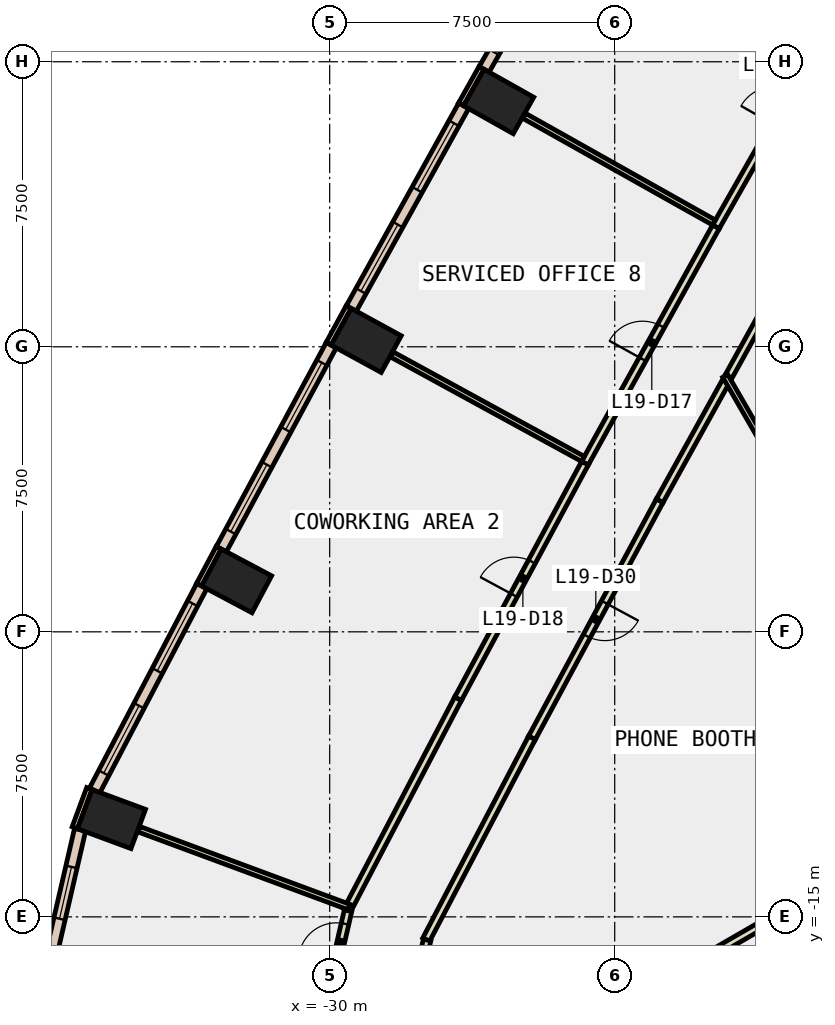
"""IFC4 building model, lengths in metres.
Left out: names, types, materials, properties, quantities, classifications, styles, units other than length and angle.
Written with IfcOpenShell. Run it as: python <this file> out.ifc"""

import sys

from ifc_helpers import new_model, si_unit, direction, frame, frame_2d, origin, origin_2d, place, context, subcontext, project, spatial, rectangle, extrude, element, fill, save


model = new_model("IFC4")
c1 = context("Model", 3, precision=1e-05, world=origin(), true_north=direction((0.0, 1.0)))
c2 = subcontext(c1, "Body", "Model", "MODEL_VIEW")
j1 = project(units=[si_unit("LENGTHUNIT", "METRE"), si_unit("PLANEANGLEUNIT", "RADIAN")], contexts=[c1])
p1 = place(None, origin())
s1 = spatial("IfcSite", under=j1, at=p1, CompositionType="ELEMENT")
p2 = place(p1, origin())
s2 = spatial("IfcBuilding", under=s1, at=p2, CompositionType="ELEMENT")
p3 = place(p2, frame((0.0, 0.0, 90.8)))
s3 = spatial("IfcBuildingStorey", under=s2, at=p3, CompositionType="ELEMENT", Elevation=90.8)
for number, where, z_axis, x_axis in (
    (1, (-25.554, 6.454, -0.4), (0.0, 0.0, 1.0), (0.49, 0.872, 0.0)),
    (2, (-29.039, 0.167, -0.4), (0.0, 0.0, 1.0), (0.48, 0.877, 0.0)),
    (3, (-32.449, -6.16, -0.4), (0.0, 0.0, 1.0), (0.469, 0.883, 0.0)),
    (4, (-35.741, -12.427, -0.4), (0.0, 0.0, 1.0), (0.347, 0.938, 0.0)),
):
    element("IfcColumn", number, at=place(p3, frame(where, z_axis=z_axis, x_axis=x_axis)), inside=s3, PredefinedType="COLUMN", context=c2, shape_type="SweptSolid", body=[
        extrude(rectangle(XDim=1.1, YDim=1.5, at=origin_2d()), origin(), (0.0, 0.0, 1.0), 4.2),
    ])
p4 = place(p3, frame((-26.004, 7.338, 0.0), z_axis=(0.0, 0.0, 1.0), x_axis=(-0.490008344094, -0.871717742574, 0.0)))
e5 = element("IfcWall", 5, at=p4, inside=s3, PredefinedType="STANDARD", context=c2, shape_type="SweptSolid", body=[
    extrude(rectangle(XDim=1.1, YDim=0.15, at=frame_2d((0.55, 0.0))), origin(), (0.0, 0.0, 1.0), 3.8),
])
p5 = place(p3, frame((-29.499, 1.046, 0.0), z_axis=(0.0, 0.0, 1.0), x_axis=(-0.479737645119, -0.877411985247, 0.0)))
e6 = element("IfcWall", 6, at=p5, inside=s3, PredefinedType="STANDARD", context=c2, shape_type="SweptSolid", body=[
    extrude(rectangle(XDim=1.101, YDim=0.15, at=frame_2d((0.55, 0.0))), origin(), (0.0, 0.0, 1.0), 3.8),
])
p6 = place(p3, frame((-32.92, -5.288, 0.0), z_axis=(0.0, 0.0, 1.0), x_axis=(-0.469366248657, -0.883003581319, 0.0)))
e7 = element("IfcWall", 7, at=p6, inside=s3, PredefinedType="STANDARD", context=c2, shape_type="SweptSolid", body=[
    extrude(rectangle(XDim=1.1, YDim=0.15, at=frame_2d((0.55, 0.0))), origin(), (0.0, 0.0, 1.0), 3.8),
])
p7 = place(p3, frame((-36.324, -11.624, 0.0), z_axis=(0.0, 0.0, 1.0), x_axis=(-0.347205967468, -0.937788897436, 0.0)))
e8 = element("IfcWall", 8, at=p7, inside=s3, PredefinedType="STANDARD", context=c2, shape_type="SweptSolid", body=[
    extrude(rectangle(XDim=1.1, YDim=0.15, at=frame_2d((0.55, 0.0))), origin(), (0.0, 0.0, 1.0), 3.8),
])
p8 = place(p3, frame((-22.918, 12.598, 0.0), z_axis=(0.0, 0.0, 1.0), x_axis=(-0.49492259535, -0.868937065967, 0.0)))
e9 = element("IfcWall", 9, at=p8, inside=s3, PredefinedType="STANDARD", context=c2, shape_type="SweptSolid", body=[
    extrude(rectangle(XDim=6.098, YDim=0.3, at=frame_2d((3.049, 0.0))), origin(), (0.0, 0.0, 1.0), 3.8),
])
p9 = place(p8, frame((0.525, 0.0, 0.9)))
e10 = element("IfcOpeningElement", 10, at=p9, cuts=e9, PredefinedType="OPENING", context=c2, shape_type="SweptSolid", body=[
    extrude(rectangle(XDim=2.0, YDim=2.6, at=frame_2d((1.0, 1.3))), frame((0.0, 0.16, 0.0), z_axis=(0.0, -1.0, 0.0), x_axis=(1.0, 0.0, 0.0)), (0.0, 0.0, 1.0), 0.32),
])
p10 = place(p8, frame((3.574, 0.0, 0.9)))
e11 = element("IfcOpeningElement", 11, at=p10, cuts=e9, PredefinedType="OPENING", context=c2, shape_type="SweptSolid", body=[
    extrude(rectangle(XDim=2.0, YDim=2.6, at=frame_2d((1.0, 1.3))), frame((0.0, 0.16, 0.0), z_axis=(0.0, -1.0, 0.0), x_axis=(1.0, 0.0, 0.0)), (0.0, 0.0, 1.0), 0.32),
])
p11 = place(p3, frame((-26.474, 6.341, 0.0), z_axis=(0.0, 0.0, 1.0), x_axis=(-0.484823579315, -0.874611969356, 0.0)))
e12 = element("IfcWall", 12, at=p11, inside=s3, PredefinedType="STANDARD", context=c2, shape_type="SweptSolid", body=[
    extrude(rectangle(XDim=6.099, YDim=0.3, at=frame_2d((3.049, 0.0))), origin(), (0.0, 0.0, 1.0), 3.8),
])
p12 = place(p11, frame((0.525, 0.0, 0.9)))
e13 = element("IfcOpeningElement", 13, at=p12, cuts=e12, PredefinedType="OPENING", context=c2, shape_type="SweptSolid", body=[
    extrude(rectangle(XDim=2.0, YDim=2.6, at=frame_2d((1.0, 1.3))), frame((0.0, 0.16, 0.0), z_axis=(0.0, -1.0, 0.0), x_axis=(1.0, 0.0, 0.0)), (0.0, 0.0, 1.0), 0.32),
])
p13 = place(p11, frame((3.574, 0.0, 0.9)))
e14 = element("IfcOpeningElement", 14, at=p13, cuts=e12, PredefinedType="OPENING", context=c2, shape_type="SweptSolid", body=[
    extrude(rectangle(XDim=2.0, YDim=2.6, at=frame_2d((1.0, 1.3))), frame((0.0, 0.16, 0.0), z_axis=(0.0, -1.0, 0.0), x_axis=(1.0, 0.0, 0.0)), (0.0, 0.0, 1.0), 0.32),
])
p14 = place(p3, frame((-29.958, 0.044, 0.0), z_axis=(0.0, 0.0, 1.0), x_axis=(-0.474369552216, -0.880325807829, 0.0)))
e15 = element("IfcWall", 15, at=p14, inside=s3, PredefinedType="STANDARD", context=c2, shape_type="SweptSolid", body=[
    extrude(rectangle(XDim=6.099, YDim=0.3, at=frame_2d((3.049, 0.0))), origin(), (0.0, 0.0, 1.0), 3.8),
])
p15 = place(p14, frame((0.525, 0.0, 0.9)))
e16 = element("IfcOpeningElement", 16, at=p15, cuts=e15, PredefinedType="OPENING", context=c2, shape_type="SweptSolid", body=[
    extrude(rectangle(XDim=2.0, YDim=2.6, at=frame_2d((1.0, 1.3))), frame((0.0, 0.16, 0.0), z_axis=(0.0, -1.0, 0.0), x_axis=(1.0, 0.0, 0.0)), (0.0, 0.0, 1.0), 0.32),
])
p16 = place(p14, frame((3.574, 0.0, 0.9)))
e17 = element("IfcOpeningElement", 17, at=p16, cuts=e15, PredefinedType="OPENING", context=c2, shape_type="SweptSolid", body=[
    extrude(rectangle(XDim=2.0, YDim=2.6, at=frame_2d((1.0, 1.3))), frame((0.0, 0.16, 0.0), z_axis=(0.0, -1.0, 0.0), x_axis=(1.0, 0.0, 0.0)), (0.0, 0.0, 1.0), 0.32),
])
p17 = place(p3, frame((-33.366, -6.295, 0.0), z_axis=(0.0, 0.0, 1.0), x_axis=(-0.464187178015, -0.885737130173, 0.0)))
e18 = element("IfcWall", 18, at=p17, inside=s3, PredefinedType="STANDARD", context=c2, shape_type="SweptSolid", body=[
    extrude(rectangle(XDim=6.075, YDim=0.3, at=frame_2d((3.038, 0.0))), origin(), (0.0, 0.0, 1.0), 3.8),
])
p18 = place(p17, frame((0.519, 0.0, 0.9)))
e19 = element("IfcOpeningElement", 19, at=p18, cuts=e18, PredefinedType="OPENING", context=c2, shape_type="SweptSolid", body=[
    extrude(rectangle(XDim=2.0, YDim=2.6, at=frame_2d((1.0, 1.3))), frame((0.0, 0.16, 0.0), z_axis=(0.0, -1.0, 0.0), x_axis=(1.0, 0.0, 0.0)), (0.0, 0.0, 1.0), 0.32),
])
p19 = place(p17, frame((3.556, 0.0, 0.9)))
e20 = element("IfcOpeningElement", 20, at=p19, cuts=e18, PredefinedType="OPENING", context=c2, shape_type="SweptSolid", body=[
    extrude(rectangle(XDim=2.0, YDim=2.6, at=frame_2d((1.0, 1.3))), frame((0.0, 0.16, 0.0), z_axis=(0.0, -1.0, 0.0), x_axis=(1.0, 0.0, 0.0)), (0.0, 0.0, 1.0), 0.32),
])
p20 = place(p3, frame((-36.568, -12.706, 0.0), z_axis=(0.0, 0.0, 1.0), x_axis=(-0.224859506699, -0.974391195695, 0.0)))
e21 = element("IfcWall", 21, at=p20, inside=s3, PredefinedType="STANDARD", context=c2, shape_type="SweptSolid", body=[
    extrude(rectangle(XDim=3.41, YDim=0.3, at=frame_2d((1.705, 0.0))), origin(), (0.0, 0.0, 1.0), 3.8),
])
p21 = place(p20, frame((1.005, 0.0, 0.9)))
e22 = element("IfcOpeningElement", 22, at=p21, cuts=e21, PredefinedType="OPENING", context=c2, shape_type="SweptSolid", body=[
    extrude(rectangle(XDim=1.4, YDim=2.6, at=frame_2d((0.7, 1.3))), frame((0.0, 0.16, 0.0), z_axis=(0.0, -1.0, 0.0), x_axis=(1.0, 0.0, 0.0)), (0.0, 0.0, 1.0), 0.32),
])
p22 = place(p3, frame((-17.883, 2.143, 0.0), z_axis=(0.0, 0.0, 1.0), x_axis=(-0.484695523805, -0.874682942101, 0.0)))
e23 = element("IfcWall", 23, at=p22, inside=s3, PredefinedType="PARTITIONING", context=c2, shape_type="SweptSolid", body=[
    extrude(rectangle(XDim=3.349, YDim=0.2, at=frame_2d((1.674, 0.0))), origin(), (0.0, 0.0, 1.0), 3.8),
])
p23 = place(p3, frame((-19.579, -0.917, 0.0), z_axis=(0.0, 0.0, 1.0), x_axis=(-0.484700239797, -0.874680328772, 0.0)))
e24 = element("IfcWall", 24, at=p23, inside=s3, PredefinedType="PARTITIONING", context=c2, shape_type="SweptSolid", body=[
    extrude(rectangle(XDim=3.585, YDim=0.2, at=frame_2d((1.792, 0.0))), origin(), (0.0, 0.0, 1.0), 3.8),
])
p24 = place(p3, frame((-21.317, -4.053, 0.0), z_axis=(0.0, 0.0, 1.0), x_axis=(-0.474391588657, -0.880313932987, 0.0)))
e25 = element("IfcWall", 25, at=p24, inside=s3, PredefinedType="PARTITIONING", context=c2, shape_type="SweptSolid", body=[
    extrude(rectangle(XDim=7.085, YDim=0.2, at=frame_2d((3.542, 0.0))), origin(), (0.0, 0.0, 1.0), 3.8),
])
p25 = place(p24, frame((3.042, 0.0, 0.0)))
e26 = element("IfcOpeningElement", 26, at=p25, cuts=e25, PredefinedType="OPENING", context=c2, shape_type="SweptSolid", body=[
    extrude(rectangle(XDim=1.0, YDim=2.1, at=frame_2d((0.5, 1.05))), frame((0.0, 0.11, 0.0), z_axis=(0.0, -1.0, 0.0), x_axis=(1.0, 0.0, 0.0)), (0.0, 0.0, 1.0), 0.22),
])
p26 = place(p3, frame((-24.678, -10.29, 0.0), z_axis=(0.0, 0.0, 1.0), x_axis=(-0.464203280494, -0.885728691179, 0.0)))
e27 = element("IfcWall", 27, at=p26, inside=s3, PredefinedType="PARTITIONING", context=c2, shape_type="SweptSolid", body=[
    extrude(rectangle(XDim=5.995, YDim=0.2, at=frame_2d((2.998, 0.0))), origin(), (0.0, 0.0, 1.0), 3.8),
])
p27 = place(p3, frame((-27.437, -15.609, 0.0), z_axis=(0.0, 0.0, 1.0), x_axis=(-0.224098195188, -0.97456656977, 0.0)))
e28 = element("IfcWall", 28, at=p27, inside=s3, PredefinedType="PARTITIONING", context=c2, shape_type="SweptSolid", body=[
    extrude(rectangle(XDim=0.375, YDim=0.2, at=frame_2d((0.188, 0.0))), origin(), (0.0, 0.0, 1.0), 3.8),
])
p28 = place(p3, frame((-19.838, 3.156, 0.0), z_axis=(0.0, 0.0, 1.0), x_axis=(0.494978648769, 0.868905137091, 0.0)))
e29 = element("IfcWall", 29, at=p28, inside=s3, PredefinedType="PARTITIONING", context=c2, shape_type="SweptSolid", body=[
    extrude(rectangle(XDim=7.186, YDim=0.2, at=frame_2d((3.593, 0.0))), origin(), (0.0, 0.0, 1.0), 3.8),
])
p29 = place(p28, frame((3.093, 0.0, 0.0)))
e30 = element("IfcOpeningElement", 30, at=p29, cuts=e29, PredefinedType="OPENING", context=c2, shape_type="SweptSolid", body=[
    extrude(rectangle(XDim=1.0, YDim=2.1, at=frame_2d((0.5, 1.05))), frame((0.0, 0.11, 0.0), z_axis=(0.0, -1.0, 0.0), x_axis=(1.0, 0.0, 0.0)), (0.0, 0.0, 1.0), 0.22),
])
p30 = place(p3, frame((-23.284, -3.064, 0.0), z_axis=(0.0, 0.0, 1.0), x_axis=(0.48478560119, 0.874633020689, 0.0)))
e31 = element("IfcWall", 31, at=p30, inside=s3, PredefinedType="PARTITIONING", context=c2, shape_type="SweptSolid", body=[
    extrude(rectangle(XDim=7.11, YDim=0.2, at=frame_2d((3.555, 0.0))), origin(), (0.0, 0.0, 1.0), 3.8),
])
p31 = place(p30, frame((3.13, 0.0, 0.0)))
e32 = element("IfcOpeningElement", 32, at=p31, cuts=e31, PredefinedType="OPENING", context=c2, shape_type="SweptSolid", body=[
    extrude(rectangle(XDim=1.0, YDim=2.1, at=frame_2d((0.5, 1.05))), frame((0.0, 0.11, 0.0), z_axis=(0.0, -1.0, 0.0), x_axis=(1.0, 0.0, 0.0)), (0.0, 0.0, 1.0), 0.22),
])
p32 = place(p3, frame((-29.541, -14.829, 0.0), z_axis=(0.0, 0.0, 1.0), x_axis=(0.46422598759, 0.885716790202, 0.0)))
e33 = element("IfcWall", 33, at=p32, inside=s3, PredefinedType="PARTITIONING", context=c2, shape_type="SweptSolid", body=[
    extrude(rectangle(XDim=6.29, YDim=0.2, at=frame_2d((3.145, 0.0))), origin(), (0.0, 0.0, 1.0), 3.8),
])
p33 = place(p3, frame((-26.621, -9.258, 0.0), z_axis=(0.0, 0.0, 1.0), x_axis=(0.474414295505, 0.880301696136, 0.0)))
e34 = element("IfcWall", 34, at=p33, inside=s3, PredefinedType="PARTITIONING", context=c2, shape_type="SweptSolid", body=[
    extrude(rectangle(XDim=7.036, YDim=0.2, at=frame_2d((3.518, 0.0))), origin(), (0.0, 0.0, 1.0), 3.8),
])
p34 = place(p33, frame((3.093, 0.0, 0.0)))
e35 = element("IfcOpeningElement", 35, at=p34, cuts=e34, PredefinedType="OPENING", context=c2, shape_type="SweptSolid", body=[
    extrude(rectangle(XDim=1.0, YDim=2.1, at=frame_2d((0.5, 1.05))), frame((0.0, 0.11, 0.0), z_axis=(0.0, -1.0, 0.0), x_axis=(1.0, 0.0, 0.0)), (0.0, 0.0, 1.0), 0.22),
])
p35 = place(p3, frame((-29.9, -16.501, 0.0), z_axis=(0.0, 0.0, 1.0), x_axis=(0.224316169854, 0.974516421587, 0.0)))
e36 = element("IfcWall", 36, at=p35, inside=s3, PredefinedType="PARTITIONING", context=c2, shape_type="SweptSolid", body=[
    extrude(rectangle(XDim=1.707, YDim=0.2, at=frame_2d((0.853, 0.0))), origin(), (0.0, 0.0, 1.0), 3.8),
])
p36 = place(p35, frame((0.353, 0.0, 0.0)))
e37 = element("IfcOpeningElement", 37, at=p36, cuts=e36, PredefinedType="OPENING", context=c2, shape_type="SweptSolid", body=[
    extrude(rectangle(XDim=1.0, YDim=2.1, at=frame_2d((0.5, 1.05))), frame((0.0, 0.11, 0.0), z_axis=(0.0, -1.0, 0.0), x_axis=(1.0, 0.0, 0.0)), (0.0, 0.0, 1.0), 0.22),
])
p37 = place(p3, frame((-13.072, -12.009, 0.0), z_axis=(0.0, 0.0, 1.0), x_axis=(-0.865993734772, -0.500054848326, 0.0)))
e38 = element("IfcWall", 38, at=p37, inside=s3, PredefinedType="PARTITIONING", context=c2, shape_type="SweptSolid", body=[
    extrude(rectangle(XDim=8.583, YDim=0.2, at=frame_2d((4.292, 0.0))), origin(), (0.0, 0.0, 1.0), 3.8),
])
p38 = place(p3, frame((-19.888, 3.27, 0.0), z_axis=(0.0, 0.0, 1.0), x_axis=(-0.871789386467, 0.489880868828, 0.0)))
e39 = element("IfcWall", 39, at=p38, inside=s3, PredefinedType="PARTITIONING", context=c2, shape_type="SweptSolid", body=[
    extrude(rectangle(XDim=5.73, YDim=0.15, at=frame_2d((2.865, 0.0))), origin(), (0.0, 0.0, 1.0), 3.8),
])
p39 = place(p3, frame((-23.336, -2.95, 0.0), z_axis=(0.0, 0.0, 1.0), x_axis=(-0.877455496162, 0.479658057637, 0.0)))
e40 = element("IfcWall", 40, at=p39, inside=s3, PredefinedType="PARTITIONING", context=c2, shape_type="SweptSolid", body=[
    extrude(rectangle(XDim=5.729, YDim=0.15, at=frame_2d((2.865, 0.0))), origin(), (0.0, 0.0, 1.0), 3.8),
])
p40 = place(p3, frame((-29.494, -14.741, 0.0), z_axis=(0.0, 0.0, 1.0), x_axis=(-0.937719767819, 0.347392626636, 0.0)))
e41 = element("IfcWall", 41, at=p40, inside=s3, PredefinedType="PARTITIONING", context=c2, shape_type="SweptSolid", body=[
    extrude(rectangle(XDim=5.892, YDim=0.15, at=frame_2d((2.946, 0.0))), origin(), (0.0, 0.0, 1.0), 3.8),
])
p41 = place(p3, frame((-15.225, -8.328, 0.0), z_axis=(0.0, 0.0, 1.0), x_axis=(-0.500038648455, 0.866003088939, 0.0)))
e42 = element("IfcWall", 42, at=p41, inside=s3, PredefinedType="PARTITIONING", context=c2, shape_type="SweptSolid", body=[
    extrude(rectangle(XDim=8.733, YDim=0.15, at=frame_2d((4.367, 0.0))), origin(), (0.0, 0.0, 1.0), 3.8),
])
p42 = place(p10, origin())
e43 = element("IfcWindow", 43, at=p42, inside=s3, PartitioningType="SINGLE_PANEL", PredefinedType="WINDOW", context=c2, shape_type="SweptSolid", body=[
    extrude(rectangle(XDim=2.0, YDim=2.6, at=frame_2d((1.0, 1.3))), frame((0.0, 0.03, 0.0), z_axis=(0.0, -1.0, 0.0), x_axis=(1.0, 0.0, 0.0)), (0.0, 0.0, 1.0), 0.06),
])
fill(e11, e43)
p43 = place(p12, origin())
e44 = element("IfcWindow", 44, at=p43, inside=s3, PartitioningType="SINGLE_PANEL", PredefinedType="WINDOW", context=c2, shape_type="SweptSolid", body=[
    extrude(rectangle(XDim=2.0, YDim=2.6, at=frame_2d((1.0, 1.3))), frame((0.0, 0.03, 0.0), z_axis=(0.0, -1.0, 0.0), x_axis=(1.0, 0.0, 0.0)), (0.0, 0.0, 1.0), 0.06),
])
fill(e13, e44)
p44 = place(p13, origin())
e45 = element("IfcWindow", 45, at=p44, inside=s3, PartitioningType="SINGLE_PANEL", PredefinedType="WINDOW", context=c2, shape_type="SweptSolid", body=[
    extrude(rectangle(XDim=2.0, YDim=2.6, at=frame_2d((1.0, 1.3))), frame((0.0, 0.03, 0.0), z_axis=(0.0, -1.0, 0.0), x_axis=(1.0, 0.0, 0.0)), (0.0, 0.0, 1.0), 0.06),
])
fill(e14, e45)
p45 = place(p15, origin())
e46 = element("IfcWindow", 46, at=p45, inside=s3, PartitioningType="SINGLE_PANEL", PredefinedType="WINDOW", context=c2, shape_type="SweptSolid", body=[
    extrude(rectangle(XDim=2.0, YDim=2.6, at=frame_2d((1.0, 1.3))), frame((0.0, 0.03, 0.0), z_axis=(0.0, -1.0, 0.0), x_axis=(1.0, 0.0, 0.0)), (0.0, 0.0, 1.0), 0.06),
])
fill(e16, e46)
p46 = place(p16, origin())
e47 = element("IfcWindow", 47, at=p46, inside=s3, PartitioningType="SINGLE_PANEL", PredefinedType="WINDOW", context=c2, shape_type="SweptSolid", body=[
    extrude(rectangle(XDim=2.0, YDim=2.6, at=frame_2d((1.0, 1.3))), frame((0.0, 0.03, 0.0), z_axis=(0.0, -1.0, 0.0), x_axis=(1.0, 0.0, 0.0)), (0.0, 0.0, 1.0), 0.06),
])
fill(e17, e47)
p47 = place(p18, origin())
e48 = element("IfcWindow", 48, at=p47, inside=s3, PartitioningType="SINGLE_PANEL", PredefinedType="WINDOW", context=c2, shape_type="SweptSolid", body=[
    extrude(rectangle(XDim=2.0, YDim=2.6, at=frame_2d((1.0, 1.3))), frame((0.0, 0.03, 0.0), z_axis=(0.0, -1.0, 0.0), x_axis=(1.0, 0.0, 0.0)), (0.0, 0.0, 1.0), 0.06),
])
fill(e19, e48)
p48 = place(p19, origin())
e49 = element("IfcWindow", 49, at=p48, inside=s3, PartitioningType="SINGLE_PANEL", PredefinedType="WINDOW", context=c2, shape_type="SweptSolid", body=[
    extrude(rectangle(XDim=2.0, YDim=2.6, at=frame_2d((1.0, 1.3))), frame((0.0, 0.03, 0.0), z_axis=(0.0, -1.0, 0.0), x_axis=(1.0, 0.0, 0.0)), (0.0, 0.0, 1.0), 0.06),
])
fill(e20, e49)
p49 = place(p21, origin())
e50 = element("IfcWindow", 50, at=p49, inside=s3, PartitioningType="SINGLE_PANEL", PredefinedType="WINDOW", context=c2, shape_type="SweptSolid", body=[
    extrude(rectangle(XDim=1.4, YDim=2.6, at=frame_2d((0.7, 1.3))), frame((0.0, 0.03, 0.0), z_axis=(0.0, -1.0, 0.0), x_axis=(1.0, 0.0, 0.0)), (0.0, 0.0, 1.0), 0.06),
])
fill(e22, e50)
p50 = place(p31, origin())
e51 = element("IfcDoor", 51, at=p50, inside=s3, OperationType="SINGLE_SWING_LEFT", PredefinedType="DOOR", context=c2, shape_type="SweptSolid", body=[
    extrude(rectangle(XDim=1.0, YDim=2.1, at=frame_2d((0.5, 1.05))), frame((0.0, 0.025, 0.0), z_axis=(0.0, -1.0, 0.0), x_axis=(1.0, 0.0, 0.0)), (0.0, 0.0, 1.0), 0.05),
])
fill(e32, e51)
p51 = place(p34, origin())
e52 = element("IfcDoor", 52, at=p51, inside=s3, OperationType="SINGLE_SWING_LEFT", PredefinedType="DOOR", context=c2, shape_type="SweptSolid", body=[
    extrude(rectangle(XDim=1.0, YDim=2.1, at=frame_2d((0.5, 1.05))), frame((0.0, 0.025, 0.0), z_axis=(0.0, -1.0, 0.0), x_axis=(1.0, 0.0, 0.0)), (0.0, 0.0, 1.0), 0.05),
])
fill(e35, e52)
p52 = place(p36, origin())
e53 = element("IfcDoor", 53, at=p52, inside=s3, OperationType="SINGLE_SWING_RIGHT", PredefinedType="DOOR", context=c2, shape_type="SweptSolid", body=[
    extrude(rectangle(XDim=1.0, YDim=2.1, at=frame_2d((0.5, 1.05))), frame((0.0, 0.025, 0.0), z_axis=(0.0, -1.0, 0.0), x_axis=(1.0, 0.0, 0.0)), (0.0, 0.0, 1.0), 0.05),
])
fill(e37, e53)
p53 = place(p25, origin())
e54 = element("IfcDoor", 54, at=p53, inside=s3, OperationType="SINGLE_SWING_RIGHT", PredefinedType="DOOR", context=c2, shape_type="SweptSolid", body=[
    extrude(rectangle(XDim=1.0, YDim=2.1, at=frame_2d((0.5, 1.05))), frame((0.0, 0.025, 0.0), z_axis=(0.0, -1.0, 0.0), x_axis=(1.0, 0.0, 0.0)), (0.0, 0.0, 1.0), 0.05),
])
fill(e26, e54)
save(model, sys.argv[1])
